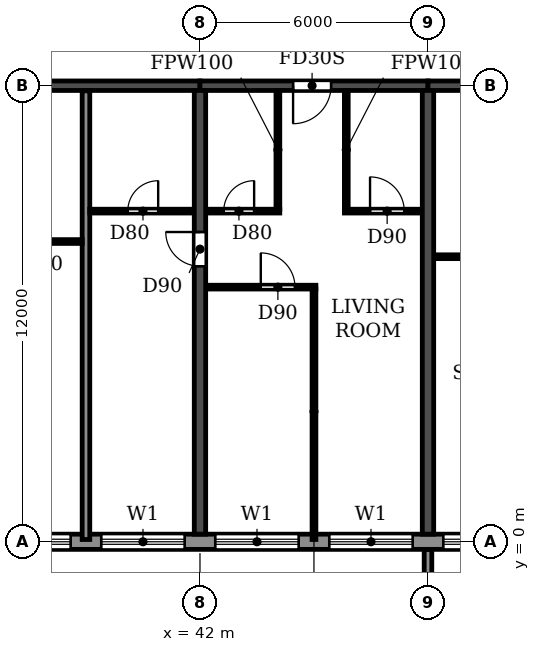
"""IFC4 building model, lengths in metres.
Left out: names, types, materials, properties, quantities, classifications, styles, units other than length and angle.
Written with IfcOpenShell. Run it as: python <this file> out.ifc"""

import sys

from ifc_helpers import new_model, si_unit, direction, frame, frame_2d, origin, place, context, subcontext, project, spatial, polyline, rectangle, outline, extrude, source, transform, mapped, element, fill, save


model = new_model("IFC4")
c1 = context("Model", 3, precision=1e-05, world=origin(), true_north=direction((0.0, 1.0)))
c2 = subcontext(c1, "Body", "Model", "MODEL_VIEW")
j1 = project(units=[si_unit("LENGTHUNIT", "METRE"), si_unit("PLANEANGLEUNIT", "RADIAN")], contexts=[c1])
p1 = place(None, origin())
s1 = spatial("IfcSite", under=j1, at=p1, CompositionType="ELEMENT")
p2 = place(p1, origin())
s2 = spatial("IfcBuilding", under=s1, at=p2, CompositionType="ELEMENT")
p3 = place(p2, frame((0.0, 0.0, 142.2)))
s3 = spatial("IfcBuildingStorey", under=s2, at=p3, CompositionType="ELEMENT", Elevation=142.2)
p4 = place(p3, frame((42.0, 0.2, 0.0), z_axis=(0.0, 0.0, 1.0), x_axis=(0.0, 1.0, 0.0)))
e1 = element("IfcWall", 1, at=p4, inside=s3, PredefinedType="SHEAR", context=c2, shape_type="SweptSolid", body=[
    extrude(rectangle(XDim=11.675, YDim=0.3, at=frame_2d((5.837, 0.0))), origin(), (0.0, 0.0, 1.0), 3.07),
])
p5 = place(p4, frame((7.05, 0.0, 0.0)))
e2 = element("IfcOpeningElement", 2, at=p5, cuts=e1, PredefinedType="OPENING", context=c2, shape_type="SweptSolid", body=[
    extrude(rectangle(XDim=0.9, YDim=2.1, at=frame_2d((0.45, 1.05))), frame((0.0, 0.16, 0.0), z_axis=(0.0, -1.0, 0.0), x_axis=(1.0, 0.0, 0.0)), (0.0, 0.0, 1.0), 0.32),
])
p6 = place(p3, frame((48.0, 0.2, 0.0), z_axis=(0.0, 0.0, 1.0), x_axis=(0.0, 1.0, 0.0)))
e3 = element("IfcWall", 3, at=p6, inside=s3, PredefinedType="SHEAR", context=c2, shape_type="SweptSolid", body=[
    extrude(rectangle(XDim=11.675, YDim=0.3, at=frame_2d((5.837, 0.0))), origin(), (0.0, 0.0, 1.0), 3.07),
])
p7 = place(p3, frame((36.0, 12.0, 0.0), z_axis=(0.0, 0.0, 1.0), x_axis=(1.0, 0.0, 0.0)))
e4 = element("IfcWall", 4, at=p7, inside=s3, PredefinedType="SHEAR", context=c2, shape_type="SweptSolid", body=[
    extrude(rectangle(XDim=6.0, YDim=0.25, at=frame_2d((3.0, 0.0))), origin(), (0.0, 0.0, 1.0), 2.47),
])
p8 = place(p3, frame((42.0, 12.0, 0.0), z_axis=(0.0, 0.0, 1.0), x_axis=(1.0, 0.0, 0.0)))
e5 = element("IfcWall", 5, at=p8, inside=s3, PredefinedType="SHEAR", context=c2, shape_type="SweptSolid", body=[
    extrude(rectangle(XDim=6.0, YDim=0.25, at=frame_2d((3.0, 0.0))), origin(), (0.0, 0.0, 1.0), 2.47),
])
p9 = place(p8, frame((2.45, 0.0, 0.0)))
e6 = element("IfcOpeningElement", 6, at=p9, cuts=e5, PredefinedType="OPENING", context=c2, shape_type="SweptSolid", body=[
    extrude(rectangle(XDim=1.0, YDim=2.1, at=frame_2d((0.5, 1.05))), frame((0.0, 0.135, 0.0), z_axis=(0.0, -1.0, 0.0), x_axis=(1.0, 0.0, 0.0)), (0.0, 0.0, 1.0), 0.27),
])
p10 = place(p3, frame((48.0, 12.0, 0.0), z_axis=(0.0, 0.0, 1.0), x_axis=(1.0, 0.0, 0.0)))
e7 = element("IfcWall", 7, at=p10, inside=s3, PredefinedType="SHEAR", context=c2, shape_type="SweptSolid", body=[
    extrude(rectangle(XDim=6.0, YDim=0.25, at=frame_2d((3.0, 0.0))), origin(), (0.0, 0.0, 1.0), 2.47),
])
p11 = place(p10, frame((2.45, 0.0, 0.0)))
e8 = element("IfcOpeningElement", 8, at=p11, cuts=e7, PredefinedType="OPENING", context=c2, shape_type="SweptSolid", body=[
    extrude(rectangle(XDim=1.0, YDim=2.1, at=frame_2d((0.5, 1.05))), frame((0.0, 0.135, 0.0), z_axis=(0.0, -1.0, 0.0), x_axis=(1.0, 0.0, 0.0)), (0.0, 0.0, 1.0), 0.27),
])
p12 = place(p3, frame((16.683, 0.0, 0.0), z_axis=(0.0, 0.0, 1.0), x_axis=(1.0, 0.0, 0.0)))
e9 = element("IfcWall", 9, at=p12, inside=s3, PredefinedType="STANDARD", context=c2, shape_type="SweptSolid", body=[
    extrude(rectangle(XDim=68.634, YDim=0.4, at=frame_2d((34.317, 0.0))), origin(), (0.0, 0.0, 1.0), 3.07),
])
p13 = place(p12, frame((1.717, 0.0, 0.9)))
e10 = element("IfcOpeningElement", 10, at=p13, cuts=e9, PredefinedType="OPENING", context=c2, shape_type="SweptSolid", body=[
    extrude(rectangle(XDim=2.2, YDim=1.5, at=frame_2d((1.1, 0.75))), frame((0.0, 0.21, 0.0), z_axis=(0.0, -1.0, 0.0), x_axis=(1.0, 0.0, 0.0)), (0.0, 0.0, 1.0), 0.42),
])
p14 = place(p12, frame((4.717, 0.0, 0.9)))
e11 = element("IfcOpeningElement", 11, at=p14, cuts=e9, PredefinedType="OPENING", context=c2, shape_type="SweptSolid", body=[
    extrude(rectangle(XDim=2.2, YDim=1.5, at=frame_2d((1.1, 0.75))), frame((0.0, 0.21, 0.0), z_axis=(0.0, -1.0, 0.0), x_axis=(1.0, 0.0, 0.0)), (0.0, 0.0, 1.0), 0.42),
])
p15 = place(p12, frame((7.717, 0.0, 0.9)))
e12 = element("IfcOpeningElement", 12, at=p15, cuts=e9, PredefinedType="OPENING", context=c2, shape_type="SweptSolid", body=[
    extrude(rectangle(XDim=2.2, YDim=1.5, at=frame_2d((1.1, 0.75))), frame((0.0, 0.21, 0.0), z_axis=(0.0, -1.0, 0.0), x_axis=(1.0, 0.0, 0.0)), (0.0, 0.0, 1.0), 0.42),
])
p16 = place(p12, frame((10.717, 0.0, 0.9)))
e13 = element("IfcOpeningElement", 13, at=p16, cuts=e9, PredefinedType="OPENING", context=c2, shape_type="SweptSolid", body=[
    extrude(rectangle(XDim=2.2, YDim=1.5, at=frame_2d((1.1, 0.75))), frame((0.0, 0.21, 0.0), z_axis=(0.0, -1.0, 0.0), x_axis=(1.0, 0.0, 0.0)), (0.0, 0.0, 1.0), 0.42),
])
p17 = place(p12, frame((13.717, 0.0, 0.9)))
e14 = element("IfcOpeningElement", 14, at=p17, cuts=e9, PredefinedType="OPENING", context=c2, shape_type="SweptSolid", body=[
    extrude(rectangle(XDim=2.2, YDim=1.5, at=frame_2d((1.1, 0.75))), frame((0.0, 0.21, 0.0), z_axis=(0.0, -1.0, 0.0), x_axis=(1.0, 0.0, 0.0)), (0.0, 0.0, 1.0), 0.42),
])
p18 = place(p12, frame((16.717, 0.0, 0.9)))
e15 = element("IfcOpeningElement", 15, at=p18, cuts=e9, PredefinedType="OPENING", context=c2, shape_type="SweptSolid", body=[
    extrude(rectangle(XDim=2.2, YDim=1.5, at=frame_2d((1.1, 0.75))), frame((0.0, 0.21, 0.0), z_axis=(0.0, -1.0, 0.0), x_axis=(1.0, 0.0, 0.0)), (0.0, 0.0, 1.0), 0.42),
])
p19 = place(p12, frame((19.717, 0.0, 0.9)))
e16 = element("IfcOpeningElement", 16, at=p19, cuts=e9, PredefinedType="OPENING", context=c2, shape_type="SweptSolid", body=[
    extrude(rectangle(XDim=2.2, YDim=1.5, at=frame_2d((1.1, 0.75))), frame((0.0, 0.21, 0.0), z_axis=(0.0, -1.0, 0.0), x_axis=(1.0, 0.0, 0.0)), (0.0, 0.0, 1.0), 0.42),
])
p20 = place(p12, frame((22.717, 0.0, 0.9)))
e17 = element("IfcOpeningElement", 17, at=p20, cuts=e9, PredefinedType="OPENING", context=c2, shape_type="SweptSolid", body=[
    extrude(rectangle(XDim=2.2, YDim=1.5, at=frame_2d((1.1, 0.75))), frame((0.0, 0.21, 0.0), z_axis=(0.0, -1.0, 0.0), x_axis=(1.0, 0.0, 0.0)), (0.0, 0.0, 1.0), 0.42),
])
p21 = place(p12, frame((25.717, 0.0, 0.9)))
e18 = element("IfcOpeningElement", 18, at=p21, cuts=e9, PredefinedType="OPENING", context=c2, shape_type="SweptSolid", body=[
    extrude(rectangle(XDim=2.2, YDim=1.5, at=frame_2d((1.1, 0.75))), frame((0.0, 0.21, 0.0), z_axis=(0.0, -1.0, 0.0), x_axis=(1.0, 0.0, 0.0)), (0.0, 0.0, 1.0), 0.42),
])
p22 = place(p12, frame((28.717, 0.0, 0.9)))
e19 = element("IfcOpeningElement", 19, at=p22, cuts=e9, PredefinedType="OPENING", context=c2, shape_type="SweptSolid", body=[
    extrude(rectangle(XDim=2.2, YDim=1.5, at=frame_2d((1.1, 0.75))), frame((0.0, 0.21, 0.0), z_axis=(0.0, -1.0, 0.0), x_axis=(1.0, 0.0, 0.0)), (0.0, 0.0, 1.0), 0.42),
])
p23 = place(p12, frame((31.717, 0.0, 0.9)))
e20 = element("IfcOpeningElement", 20, at=p23, cuts=e9, PredefinedType="OPENING", context=c2, shape_type="SweptSolid", body=[
    extrude(rectangle(XDim=2.2, YDim=1.5, at=frame_2d((1.1, 0.75))), frame((0.0, 0.21, 0.0), z_axis=(0.0, -1.0, 0.0), x_axis=(1.0, 0.0, 0.0)), (0.0, 0.0, 1.0), 0.42),
])
p24 = place(p12, frame((34.917, 0.0, 0.0)))
e21 = element("IfcOpeningElement", 21, at=p24, cuts=e9, PredefinedType="OPENING", context=c2, shape_type="SweptSolid", body=[
    extrude(rectangle(XDim=1.8, YDim=2.4, at=frame_2d((0.9, 1.2))), frame((0.0, 0.21, 0.0), z_axis=(0.0, -1.0, 0.0), x_axis=(1.0, 0.0, 0.0)), (0.0, 0.0, 1.0), 0.42),
])
p25 = place(p12, frame((37.717, 0.0, 0.9)))
e22 = element("IfcOpeningElement", 22, at=p25, cuts=e9, PredefinedType="OPENING", context=c2, shape_type="SweptSolid", body=[
    extrude(rectangle(XDim=2.2, YDim=1.5, at=frame_2d((1.1, 0.75))), frame((0.0, 0.21, 0.0), z_axis=(0.0, -1.0, 0.0), x_axis=(1.0, 0.0, 0.0)), (0.0, 0.0, 1.0), 0.42),
])
p26 = place(p12, frame((40.717, 0.0, 0.9)))
e23 = element("IfcOpeningElement", 23, at=p26, cuts=e9, PredefinedType="OPENING", context=c2, shape_type="SweptSolid", body=[
    extrude(rectangle(XDim=2.2, YDim=1.5, at=frame_2d((1.1, 0.75))), frame((0.0, 0.21, 0.0), z_axis=(0.0, -1.0, 0.0), x_axis=(1.0, 0.0, 0.0)), (0.0, 0.0, 1.0), 0.42),
])
p27 = place(p12, frame((43.717, 0.0, 0.9)))
e24 = element("IfcOpeningElement", 24, at=p27, cuts=e9, PredefinedType="OPENING", context=c2, shape_type="SweptSolid", body=[
    extrude(rectangle(XDim=2.2, YDim=1.5, at=frame_2d((1.1, 0.75))), frame((0.0, 0.21, 0.0), z_axis=(0.0, -1.0, 0.0), x_axis=(1.0, 0.0, 0.0)), (0.0, 0.0, 1.0), 0.42),
])
p28 = place(p12, frame((46.917, 0.0, 0.0)))
e25 = element("IfcOpeningElement", 25, at=p28, cuts=e9, PredefinedType="OPENING", context=c2, shape_type="SweptSolid", body=[
    extrude(rectangle(XDim=1.8, YDim=2.4, at=frame_2d((0.9, 1.2))), frame((0.0, 0.21, 0.0), z_axis=(0.0, -1.0, 0.0), x_axis=(1.0, 0.0, 0.0)), (0.0, 0.0, 1.0), 0.42),
])
p29 = place(p12, frame((49.717, 0.0, 0.9)))
e26 = element("IfcOpeningElement", 26, at=p29, cuts=e9, PredefinedType="OPENING", context=c2, shape_type="SweptSolid", body=[
    extrude(rectangle(XDim=2.2, YDim=1.5, at=frame_2d((1.1, 0.75))), frame((0.0, 0.21, 0.0), z_axis=(0.0, -1.0, 0.0), x_axis=(1.0, 0.0, 0.0)), (0.0, 0.0, 1.0), 0.42),
])
p30 = place(p12, frame((52.717, 0.0, 0.9)))
e27 = element("IfcOpeningElement", 27, at=p30, cuts=e9, PredefinedType="OPENING", context=c2, shape_type="SweptSolid", body=[
    extrude(rectangle(XDim=2.2, YDim=1.5, at=frame_2d((1.1, 0.75))), frame((0.0, 0.21, 0.0), z_axis=(0.0, -1.0, 0.0), x_axis=(1.0, 0.0, 0.0)), (0.0, 0.0, 1.0), 0.42),
])
p31 = place(p12, frame((55.717, 0.0, 0.9)))
e28 = element("IfcOpeningElement", 28, at=p31, cuts=e9, PredefinedType="OPENING", context=c2, shape_type="SweptSolid", body=[
    extrude(rectangle(XDim=2.2, YDim=1.5, at=frame_2d((1.1, 0.75))), frame((0.0, 0.21, 0.0), z_axis=(0.0, -1.0, 0.0), x_axis=(1.0, 0.0, 0.0)), (0.0, 0.0, 1.0), 0.42),
])
p32 = place(p12, frame((58.717, 0.0, 0.9)))
e29 = element("IfcOpeningElement", 29, at=p32, cuts=e9, PredefinedType="OPENING", context=c2, shape_type="SweptSolid", body=[
    extrude(rectangle(XDim=2.2, YDim=1.5, at=frame_2d((1.1, 0.75))), frame((0.0, 0.21, 0.0), z_axis=(0.0, -1.0, 0.0), x_axis=(1.0, 0.0, 0.0)), (0.0, 0.0, 1.0), 0.42),
])
p33 = place(p12, frame((61.717, 0.0, 0.9)))
e30 = element("IfcOpeningElement", 30, at=p33, cuts=e9, PredefinedType="OPENING", context=c2, shape_type="SweptSolid", body=[
    extrude(rectangle(XDim=2.2, YDim=1.5, at=frame_2d((1.1, 0.75))), frame((0.0, 0.21, 0.0), z_axis=(0.0, -1.0, 0.0), x_axis=(1.0, 0.0, 0.0)), (0.0, 0.0, 1.0), 0.42),
])
p34 = place(p12, frame((64.717, 0.0, 0.9)))
e31 = element("IfcOpeningElement", 31, at=p34, cuts=e9, PredefinedType="OPENING", context=c2, shape_type="SweptSolid", body=[
    extrude(rectangle(XDim=2.2, YDim=1.5, at=frame_2d((1.1, 0.75))), frame((0.0, 0.21, 0.0), z_axis=(0.0, -1.0, 0.0), x_axis=(1.0, 0.0, 0.0)), (0.0, 0.0, 1.0), 0.42),
])
m1 = source(origin(), c2, "Body", "SweptSolid", [
    extrude(outline(polyline([(0.0, 0.0), (0.2, 0.0), (0.2, 1.65), (0.0, 1.65), (0.0, 0.0)])), origin(), (0.0, 0.0, 1.0), 3.1),
])
p35 = place(p3, frame((47.9, -1.85, 0.0)))
e32 = element("IfcWall", 32, at=p35, inside=s3, PredefinedType="STANDARD", context=c2, shape_type="MappedRepresentation", body=[
    mapped(m1, transform((0.0, 0.0, 0.0))),
])
p36 = place(p3, frame((39.0, 0.06, 0.0), z_axis=(0.0, 0.0, 1.0), x_axis=(0.0, 1.0, 0.0)))
e33 = element("IfcWall", 33, at=p36, inside=s3, PredefinedType="PARTITIONING", context=c2, shape_type="SweptSolid", body=[
    extrude(rectangle(XDim=11.805, YDim=0.2, at=frame_2d((5.902, 0.0))), origin(), (0.0, 0.0, 1.0), 3.07),
])
p37 = place(p3, frame((42.16, 6.7, 0.0), z_axis=(0.0, 0.0, 1.0), x_axis=(1.0, 0.0, 0.0)))
e34 = element("IfcWall", 34, at=p37, inside=s3, PredefinedType="PARTITIONING", context=c2, shape_type="SweptSolid", body=[
    extrude(rectangle(XDim=2.89, YDim=0.1, at=frame_2d((1.445, 0.0))), origin(), (0.0, 0.0, 1.0), 3.07),
])
p38 = place(p37, frame((1.44, 0.0, 0.0)))
e35 = element("IfcOpeningElement", 35, at=p38, cuts=e34, PredefinedType="OPENING", context=c2, shape_type="SweptSolid", body=[
    extrude(rectangle(XDim=0.9, YDim=2.1, at=frame_2d((0.45, 1.05))), frame((0.0, 0.06, 0.0), z_axis=(0.0, -1.0, 0.0), x_axis=(1.0, 0.0, 0.0)), (0.0, 0.0, 1.0), 0.12),
])
p39 = place(p3, frame((48.16, 7.5, 0.0), z_axis=(0.0, 0.0, 1.0), x_axis=(1.0, 0.0, 0.0)))
e36 = element("IfcWall", 36, at=p39, inside=s3, PredefinedType="PARTITIONING", context=c2, shape_type="SweptSolid", body=[
    extrude(rectangle(XDim=1.94, YDim=0.1, at=frame_2d((0.97, 0.0))), origin(), (0.0, 0.0, 1.0), 3.07),
])
p40 = place(p3, frame((36.16, 7.9, 0.0), z_axis=(0.0, 0.0, 1.0), x_axis=(1.0, 0.0, 0.0)))
e37 = element("IfcWall", 37, at=p40, inside=s3, PredefinedType="PARTITIONING", context=c2, shape_type="SweptSolid", body=[
    extrude(rectangle(XDim=2.74, YDim=0.1, at=frame_2d((1.37, 0.0))), origin(), (0.0, 0.0, 1.0), 3.07),
])
p41 = place(p40, frame((0.94, 0.0, 0.0)))
e38 = element("IfcOpeningElement", 38, at=p41, cuts=e37, PredefinedType="OPENING", context=c2, shape_type="SweptSolid", body=[
    extrude(rectangle(XDim=0.8, YDim=2.1, at=frame_2d((0.4, 1.05))), frame((0.0, 0.06, 0.0), z_axis=(0.0, -1.0, 0.0), x_axis=(1.0, 0.0, 0.0)), (0.0, 0.0, 1.0), 0.12),
])
p42 = place(p3, frame((39.1, 8.7, 0.0), z_axis=(0.0, 0.0, 1.0), x_axis=(1.0, 0.0, 0.0)))
e39 = element("IfcWall", 39, at=p42, inside=s3, PredefinedType="PARTITIONING", context=c2, shape_type="SweptSolid", body=[
    extrude(rectangle(XDim=2.74, YDim=0.1, at=frame_2d((1.37, 0.0))), origin(), (0.0, 0.0, 1.0), 3.07),
])
p43 = place(p42, frame((1.0, 0.0, 0.0)))
e40 = element("IfcOpeningElement", 40, at=p43, cuts=e39, PredefinedType="OPENING", context=c2, shape_type="SweptSolid", body=[
    extrude(rectangle(XDim=0.8, YDim=2.1, at=frame_2d((0.4, 1.05))), frame((0.0, 0.06, 0.0), z_axis=(0.0, -1.0, 0.0), x_axis=(1.0, 0.0, 0.0)), (0.0, 0.0, 1.0), 0.12),
])
p44 = place(p3, frame((42.16, 8.7, 0.0), z_axis=(0.0, 0.0, 1.0), x_axis=(1.0, 0.0, 0.0)))
e41 = element("IfcWall", 41, at=p44, inside=s3, PredefinedType="PARTITIONING", context=c2, shape_type="SweptSolid", body=[
    extrude(rectangle(XDim=1.94, YDim=0.1, at=frame_2d((0.97, 0.0))), origin(), (0.0, 0.0, 1.0), 3.07),
])
p45 = place(p44, frame((0.465, 0.0, 0.0)))
e42 = element("IfcOpeningElement", 42, at=p45, cuts=e41, PredefinedType="OPENING", context=c2, shape_type="SweptSolid", body=[
    extrude(rectangle(XDim=0.8, YDim=2.1, at=frame_2d((0.4, 1.05))), frame((0.0, 0.06, 0.0), z_axis=(0.0, -1.0, 0.0), x_axis=(1.0, 0.0, 0.0)), (0.0, 0.0, 1.0), 0.12),
])
p46 = place(p3, frame((45.8, 8.7, 0.0), z_axis=(0.0, 0.0, 1.0), x_axis=(1.0, 0.0, 0.0)))
e43 = element("IfcWall", 43, at=p46, inside=s3, PredefinedType="PARTITIONING", context=c2, shape_type="SweptSolid", body=[
    extrude(rectangle(XDim=2.04, YDim=0.1, at=frame_2d((1.02, 0.0))), origin(), (0.0, 0.0, 1.0), 3.07),
])
p47 = place(p46, frame((0.675, 0.0, 0.0)))
e44 = element("IfcOpeningElement", 44, at=p47, cuts=e43, PredefinedType="OPENING", context=c2, shape_type="SweptSolid", body=[
    extrude(rectangle(XDim=0.9, YDim=2.1, at=frame_2d((0.45, 1.05))), frame((0.0, 0.06, 0.0), z_axis=(0.0, -1.0, 0.0), x_axis=(1.0, 0.0, 0.0)), (0.0, 0.0, 1.0), 0.12),
])
p48 = place(p3, frame((44.05, 8.75, 0.0), z_axis=(0.0, 0.0, 1.0), x_axis=(0.0, 1.0, 0.0)))
e45 = element("IfcWall", 45, at=p48, inside=s3, PredefinedType="PARTITIONING", context=c2, shape_type="SweptSolid", body=[
    extrude(rectangle(XDim=3.115, YDim=0.1, at=frame_2d((1.558, 0.0))), origin(), (0.0, 0.0, 1.0), 3.07),
])
p49 = place(p3, frame((45.0, 0.06, 0.0), z_axis=(0.0, 0.0, 1.0), x_axis=(0.0, 1.0, 0.0)))
e46 = element("IfcWall", 46, at=p49, inside=s3, PredefinedType="PARTITIONING", context=c2, shape_type="SweptSolid", body=[
    extrude(rectangle(XDim=6.59, YDim=0.1, at=frame_2d((3.295, 0.0))), origin(), (0.0, 0.0, 1.0), 3.07),
])
p50 = place(p3, frame((45.85, 8.75, 0.0), z_axis=(0.0, 0.0, 1.0), x_axis=(0.0, 1.0, 0.0)))
e47 = element("IfcWall", 47, at=p50, inside=s3, PredefinedType="PARTITIONING", context=c2, shape_type="SweptSolid", body=[
    extrude(rectangle(XDim=3.115, YDim=0.1, at=frame_2d((1.558, 0.0))), origin(), (0.0, 0.0, 1.0), 3.07),
])
p51 = place(p19, origin())
e48 = element("IfcWindow", 48, at=p51, inside=s3, PartitioningType="DOUBLE_PANEL_HORIZONTAL", PredefinedType="WINDOW", context=c2, shape_type="SweptSolid", body=[
    extrude(rectangle(XDim=2.2, YDim=1.5, at=frame_2d((1.1, 0.75))), frame((0.0, 0.03, 0.0), z_axis=(0.0, -1.0, 0.0), x_axis=(1.0, 0.0, 0.0)), (0.0, 0.0, 1.0), 0.06),
])
fill(e16, e48)
p52 = place(p20, origin())
e49 = element("IfcWindow", 49, at=p52, inside=s3, PartitioningType="DOUBLE_PANEL_HORIZONTAL", PredefinedType="WINDOW", context=c2, shape_type="SweptSolid", body=[
    extrude(rectangle(XDim=2.2, YDim=1.5, at=frame_2d((1.1, 0.75))), frame((0.0, 0.03, 0.0), z_axis=(0.0, -1.0, 0.0), x_axis=(1.0, 0.0, 0.0)), (0.0, 0.0, 1.0), 0.06),
])
fill(e17, e49)
p53 = place(p21, origin())
e50 = element("IfcWindow", 50, at=p53, inside=s3, PartitioningType="DOUBLE_PANEL_HORIZONTAL", PredefinedType="WINDOW", context=c2, shape_type="SweptSolid", body=[
    extrude(rectangle(XDim=2.2, YDim=1.5, at=frame_2d((1.1, 0.75))), frame((0.0, 0.03, 0.0), z_axis=(0.0, -1.0, 0.0), x_axis=(1.0, 0.0, 0.0)), (0.0, 0.0, 1.0), 0.06),
])
fill(e18, e50)
p54 = place(p22, origin())
e51 = element("IfcWindow", 51, at=p54, inside=s3, PartitioningType="DOUBLE_PANEL_HORIZONTAL", PredefinedType="WINDOW", context=c2, shape_type="SweptSolid", body=[
    extrude(rectangle(XDim=2.2, YDim=1.5, at=frame_2d((1.1, 0.75))), frame((0.0, 0.03, 0.0), z_axis=(0.0, -1.0, 0.0), x_axis=(1.0, 0.0, 0.0)), (0.0, 0.0, 1.0), 0.06),
])
fill(e19, e51)
p55 = place(p23, origin())
e52 = element("IfcWindow", 52, at=p55, inside=s3, PartitioningType="DOUBLE_PANEL_HORIZONTAL", PredefinedType="WINDOW", context=c2, shape_type="SweptSolid", body=[
    extrude(rectangle(XDim=2.2, YDim=1.5, at=frame_2d((1.1, 0.75))), frame((0.0, 0.03, 0.0), z_axis=(0.0, -1.0, 0.0), x_axis=(1.0, 0.0, 0.0)), (0.0, 0.0, 1.0), 0.06),
])
fill(e20, e52)
p56 = place(p43, origin())
e53 = element("IfcDoor", 53, at=p56, inside=s3, OperationType="SINGLE_SWING_RIGHT", PredefinedType="DOOR", context=c2, shape_type="SweptSolid", body=[
    extrude(rectangle(XDim=0.8, YDim=2.1, at=frame_2d((0.4, 1.05))), frame((0.0, 0.025, 0.0), z_axis=(0.0, -1.0, 0.0), x_axis=(1.0, 0.0, 0.0)), (0.0, 0.0, 1.0), 0.05),
])
fill(e40, e53)
p57 = place(p5, origin())
e54 = element("IfcDoor", 54, at=p57, inside=s3, OperationType="SINGLE_SWING_RIGHT", PredefinedType="DOOR", context=c2, shape_type="SweptSolid", body=[
    extrude(rectangle(XDim=0.9, YDim=2.1, at=frame_2d((0.45, 1.05))), frame((0.0, 0.025, 0.0), z_axis=(0.0, -1.0, 0.0), x_axis=(1.0, 0.0, 0.0)), (0.0, 0.0, 1.0), 0.05),
])
fill(e2, e54)
p58 = place(p45, origin())
e55 = element("IfcDoor", 55, at=p58, inside=s3, OperationType="SINGLE_SWING_RIGHT", PredefinedType="DOOR", context=c2, shape_type="SweptSolid", body=[
    extrude(rectangle(XDim=0.8, YDim=2.1, at=frame_2d((0.4, 1.05))), frame((0.0, 0.025, 0.0), z_axis=(0.0, -1.0, 0.0), x_axis=(1.0, 0.0, 0.0)), (0.0, 0.0, 1.0), 0.05),
])
fill(e42, e55)
p59 = place(p38, origin())
e56 = element("IfcDoor", 56, at=p59, inside=s3, OperationType="SINGLE_SWING_LEFT", PredefinedType="DOOR", context=c2, shape_type="SweptSolid", body=[
    extrude(rectangle(XDim=0.9, YDim=2.1, at=frame_2d((0.45, 1.05))), frame((0.0, 0.025, 0.0), z_axis=(0.0, -1.0, 0.0), x_axis=(1.0, 0.0, 0.0)), (0.0, 0.0, 1.0), 0.05),
])
fill(e35, e56)
p60 = place(p9, frame((1.0, 0.0, 0.0), z_axis=(0.0, 0.0, 1.0), x_axis=(-1.0, 0.0, 0.0)))
e57 = element("IfcDoor", 57, at=p60, inside=s3, OperationType="SINGLE_SWING_RIGHT", PredefinedType="DOOR", context=c2, shape_type="SweptSolid", body=[
    extrude(rectangle(XDim=1.0, YDim=2.1, at=frame_2d((0.5, 1.05))), frame((0.0, 0.025, 0.0), z_axis=(0.0, -1.0, 0.0), x_axis=(1.0, 0.0, 0.0)), (0.0, 0.0, 1.0), 0.05),
])
fill(e6, e57)
p61 = place(p47, origin())
e58 = element("IfcDoor", 58, at=p61, inside=s3, OperationType="SINGLE_SWING_LEFT", PredefinedType="DOOR", context=c2, shape_type="SweptSolid", body=[
    extrude(rectangle(XDim=0.9, YDim=2.1, at=frame_2d((0.45, 1.05))), frame((0.0, 0.025, 0.0), z_axis=(0.0, -1.0, 0.0), x_axis=(1.0, 0.0, 0.0)), (0.0, 0.0, 1.0), 0.05),
])
fill(e44, e58)
save(model, sys.argv[1])
